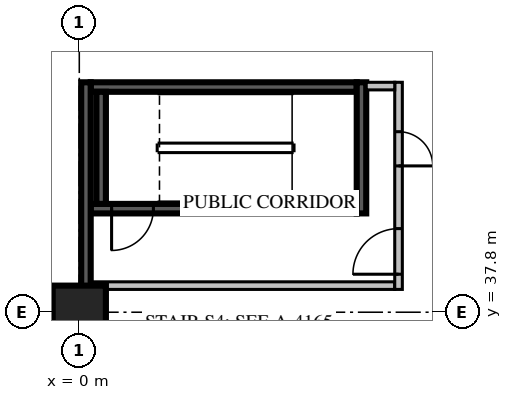
"""IFC4 building model, lengths in metres.
Left out: names, types, materials, properties, quantities, classifications, styles, units other than length and angle.
Written with IfcOpenShell. Run it as: python <this file> out.ifc"""

import sys

from ifc_helpers import new_model, si_unit, direction, frame, frame_2d, origin, origin_2d, place, context, subcontext, project, spatial, rectangle, extrude, source, transform, mapped, element, fill, save


model = new_model("IFC4")
c1 = context("Model", 3, precision=1e-05, world=origin(), true_north=direction((0.0, 1.0)))
c2 = subcontext(c1, "Body", "Model", "MODEL_VIEW")
j1 = project(units=[si_unit("LENGTHUNIT", "METRE"), si_unit("PLANEANGLEUNIT", "RADIAN")], contexts=[c1])
p1 = place(None, origin())
s1 = spatial("IfcSite", under=j1, at=p1, CompositionType="ELEMENT")
p2 = place(p1, origin())
s2 = spatial("IfcBuilding", under=s1, at=p2, CompositionType="ELEMENT")
p3 = place(p2, frame((0.0, 0.0, 18.3)))
s3 = spatial("IfcBuildingStorey", under=s2, at=p3, CompositionType="ELEMENT", Elevation=18.3)
m1 = source(origin(), c2, "Body", "SweptSolid", [
    extrude(rectangle(XDim=1.4, YDim=1.4, at=origin_2d()), origin(), (0.0, 0.0, 1.0), 5.4),
])
p4 = place(p3, frame((0.0, 37.8, 0.0), z_axis=(0.0, 0.0, 1.0), x_axis=(1.0, 0.0, 0.0)))
e1 = element("IfcColumn", 1, at=p4, inside=s3, PredefinedType="COLUMN", context=c2, shape_type="MappedRepresentation", body=[
    mapped(m1, transform((0.0, 0.0, 0.0), scale=1.0)),
])
m2 = source(origin(), c2, "Body", "SweptSolid", [
    extrude(rectangle(XDim=7.0, YDim=0.25, at=frame_2d((3.5, 0.0))), origin(), (0.0, 0.0, 1.0), 4.8),
])
p5 = place(p3, frame((0.3, 40.525, 0.0), z_axis=(0.0, 0.0, 1.0), x_axis=(1.0, 0.0, 0.0)))
e2 = element("IfcWall", 2, at=p5, inside=s3, PredefinedType="SOLIDWALL", context=c2, shape_type="MappedRepresentation", body=[
    mapped(m2, transform((0.0, 0.0, 0.0), scale=1.0)),
])
m3 = source(origin(), c2, "Body", "SweptSolid", [
    extrude(rectangle(XDim=1.1, YDim=2.1, at=frame_2d((0.55, 1.05))), frame((0.0, 0.135, 0.0), z_axis=(0.0, -1.0, 0.0), x_axis=(1.0, 0.0, 0.0)), (0.0, 0.0, 1.0), 0.27),
])
p6 = place(p5, frame((0.55, 0.0, 0.0)))
e3 = element("IfcOpeningElement", 3, at=p6, cuts=e2, PredefinedType="OPENING", context=c2, shape_type="MappedRepresentation", body=[
    mapped(m3, transform((0.0, 0.0, 0.0), scale=1.0)),
])
p7 = place(p3, frame((0.3, 43.725, 0.0), z_axis=(0.0, 0.0, 1.0), x_axis=(1.0, 0.0, 0.0)))
e4 = element("IfcWall", 4, at=p7, inside=s3, PredefinedType="SOLIDWALL", context=c2, shape_type="MappedRepresentation", body=[
    mapped(m2, transform((0.0, 0.0, 0.0), scale=1.0)),
])
m4 = source(origin(), c2, "Body", "SweptSolid", [
    extrude(rectangle(XDim=3.45, YDim=0.25, at=frame_2d((1.725, 0.0))), origin(), (0.0, 0.0, 1.0), 4.8),
])
p8 = place(p3, frame((7.425, 40.4, 0.0), z_axis=(0.0, 0.0, 1.0), x_axis=(0.0, 1.0, 0.0)))
e5 = element("IfcWall", 5, at=p8, inside=s3, PredefinedType="SOLIDWALL", context=c2, shape_type="MappedRepresentation", body=[
    mapped(m4, transform((0.0, 0.0, 0.0), scale=1.0)),
])
m5 = source(origin(), c2, "Body", "SweptSolid", [
    extrude(rectangle(XDim=2.95, YDim=0.25, at=frame_2d((1.475, 0.0))), origin(), (0.0, 0.0, 1.0), 4.8),
])
p9 = place(p3, frame((0.575, 40.65, 0.0), z_axis=(0.0, 0.0, 1.0), x_axis=(0.0, 1.0, 0.0)))
e6 = element("IfcWall", 6, at=p9, inside=s3, PredefinedType="SOLIDWALL", context=c2, shape_type="MappedRepresentation", body=[
    mapped(m5, transform((0.0, 0.0, 0.0), scale=1.0)),
])
m6 = source(origin(), c2, "Body", "SweptSolid", [
    extrude(rectangle(XDim=8.0, YDim=0.2, at=frame_2d((4.0, 0.0))), origin(), (0.0, 0.0, 1.0), 4.8),
])
p10 = place(p3, frame((0.3, 38.5, 0.0), z_axis=(0.0, 0.0, 1.0), x_axis=(1.0, 0.0, 0.0)))
e7 = element("IfcWall", 7, at=p10, inside=s3, PredefinedType="PARTITIONING", context=c2, shape_type="MappedRepresentation", body=[
    mapped(m6, transform((0.0, 0.0, 0.0), scale=1.0)),
])
m7 = source(origin(), c2, "Body", "SweptSolid", [
    extrude(rectangle(XDim=5.45, YDim=0.2, at=frame_2d((2.725, 0.0))), origin(), (0.0, 0.0, 1.0), 4.8),
])
p11 = place(p3, frame((8.4, 38.4, 0.0), z_axis=(0.0, 0.0, 1.0), x_axis=(0.0, 1.0, 0.0)))
e8 = element("IfcWall", 8, at=p11, inside=s3, PredefinedType="PARTITIONING", context=c2, shape_type="MappedRepresentation", body=[
    mapped(m7, transform((0.0, 0.0, 0.0), scale=1.0)),
])
m8 = source(origin(), c2, "Body", "SweptSolid", [
    extrude(rectangle(XDim=1.2, YDim=2.1, at=frame_2d((0.6, 1.05))), frame((0.0, 0.11, 0.0), z_axis=(0.0, -1.0, 0.0), x_axis=(1.0, 0.0, 0.0)), (0.0, 0.0, 1.0), 0.22),
])
p12 = place(p11, frame((0.4, 0.0, 0.0)))
e9 = element("IfcOpeningElement", 9, at=p12, cuts=e8, PredefinedType="OPENING", context=c2, shape_type="MappedRepresentation", body=[
    mapped(m8, transform((0.0, 0.0, 0.0), scale=1.0)),
])
m9 = source(origin(), c2, "Body", "SweptSolid", [
    extrude(rectangle(XDim=0.9, YDim=2.1, at=frame_2d((0.45, 1.05))), frame((0.0, 0.11, 0.0), z_axis=(0.0, -1.0, 0.0), x_axis=(1.0, 0.0, 0.0)), (0.0, 0.0, 1.0), 0.22),
])
p13 = place(p11, frame((3.25, 0.0, 0.0)))
e10 = element("IfcOpeningElement", 10, at=p13, cuts=e8, PredefinedType="OPENING", context=c2, shape_type="MappedRepresentation", body=[
    mapped(m9, transform((0.0, 0.0, 0.0), scale=1.0)),
])
m10 = source(origin(), c2, "Body", "SweptSolid", [
    extrude(rectangle(XDim=0.75, YDim=0.2, at=frame_2d((0.375, 0.0))), origin(), (0.0, 0.0, 1.0), 4.8),
])
p14 = place(p3, frame((7.55, 43.75, 0.0), z_axis=(0.0, 0.0, 1.0), x_axis=(1.0, 0.0, 0.0)))
e11 = element("IfcWall", 11, at=p14, inside=s3, PredefinedType="PARTITIONING", context=c2, shape_type="MappedRepresentation", body=[
    mapped(m10, transform((0.0, 0.0, 0.0), scale=1.0)),
])
m11 = source(origin(), c2, "Body", "SweptSolid", [
    extrude(rectangle(XDim=5.45, YDim=0.25, at=frame_2d((2.725, 0.0))), origin(), (0.0, 0.0, 1.0), 4.8),
])
p15 = place(p3, frame((0.175, 38.4, 0.0), z_axis=(0.0, 0.0, 1.0), x_axis=(0.0, 1.0, 0.0)))
e12 = element("IfcWall", 12, at=p15, inside=s3, PredefinedType="SOLIDWALL", context=c2, shape_type="MappedRepresentation", body=[
    mapped(m11, transform((0.0, 0.0, 0.0), scale=1.0)),
])
m12 = source(origin(), c2, "Body", "SweptSolid", [
    extrude(rectangle(XDim=1.1, YDim=2.1, at=frame_2d((0.55, 1.05))), frame((0.0, 0.025, 0.0), z_axis=(0.0, -1.0, 0.0), x_axis=(1.0, 0.0, 0.0)), (0.0, 0.0, 1.0), 0.05),
])
p16 = place(p6, origin())
e13 = element("IfcDoor", 13, at=p16, inside=s3, OperationType="SINGLE_SWING_RIGHT", PredefinedType="DOOR", context=c2, shape_type="MappedRepresentation", body=[
    mapped(m12, transform((0.0, 0.0, 0.0), scale=1.0)),
])
fill(e3, e13)
m13 = source(origin(), c2, "Body", "SweptSolid", [
    extrude(rectangle(XDim=1.2, YDim=2.1, at=frame_2d((0.6, 1.05))), frame((0.0, 0.025, 0.0), z_axis=(0.0, -1.0, 0.0), x_axis=(1.0, 0.0, 0.0)), (0.0, 0.0, 1.0), 0.05),
])
p17 = place(p12, origin())
e14 = element("IfcDoor", 14, at=p17, inside=s3, OperationType="SINGLE_SWING_LEFT", PredefinedType="DOOR", context=c2, shape_type="MappedRepresentation", body=[
    mapped(m13, transform((0.0, 0.0, 0.0), scale=1.0)),
])
fill(e9, e14)
m14 = source(origin(), c2, "Body", "SweptSolid", [
    extrude(rectangle(XDim=0.9, YDim=2.1, at=frame_2d((0.45, 1.05))), frame((0.0, 0.025, 0.0), z_axis=(0.0, -1.0, 0.0), x_axis=(1.0, 0.0, 0.0)), (0.0, 0.0, 1.0), 0.05),
])
p18 = place(p13, origin())
e15 = element("IfcDoor", 15, at=p18, inside=s3, OperationType="SINGLE_SWING_RIGHT", PredefinedType="DOOR", context=c2, shape_type="MappedRepresentation", body=[
    mapped(m14, transform((0.0, 0.0, 0.0), scale=1.0)),
])
fill(e10, e15)
save(model, sys.argv[1])
